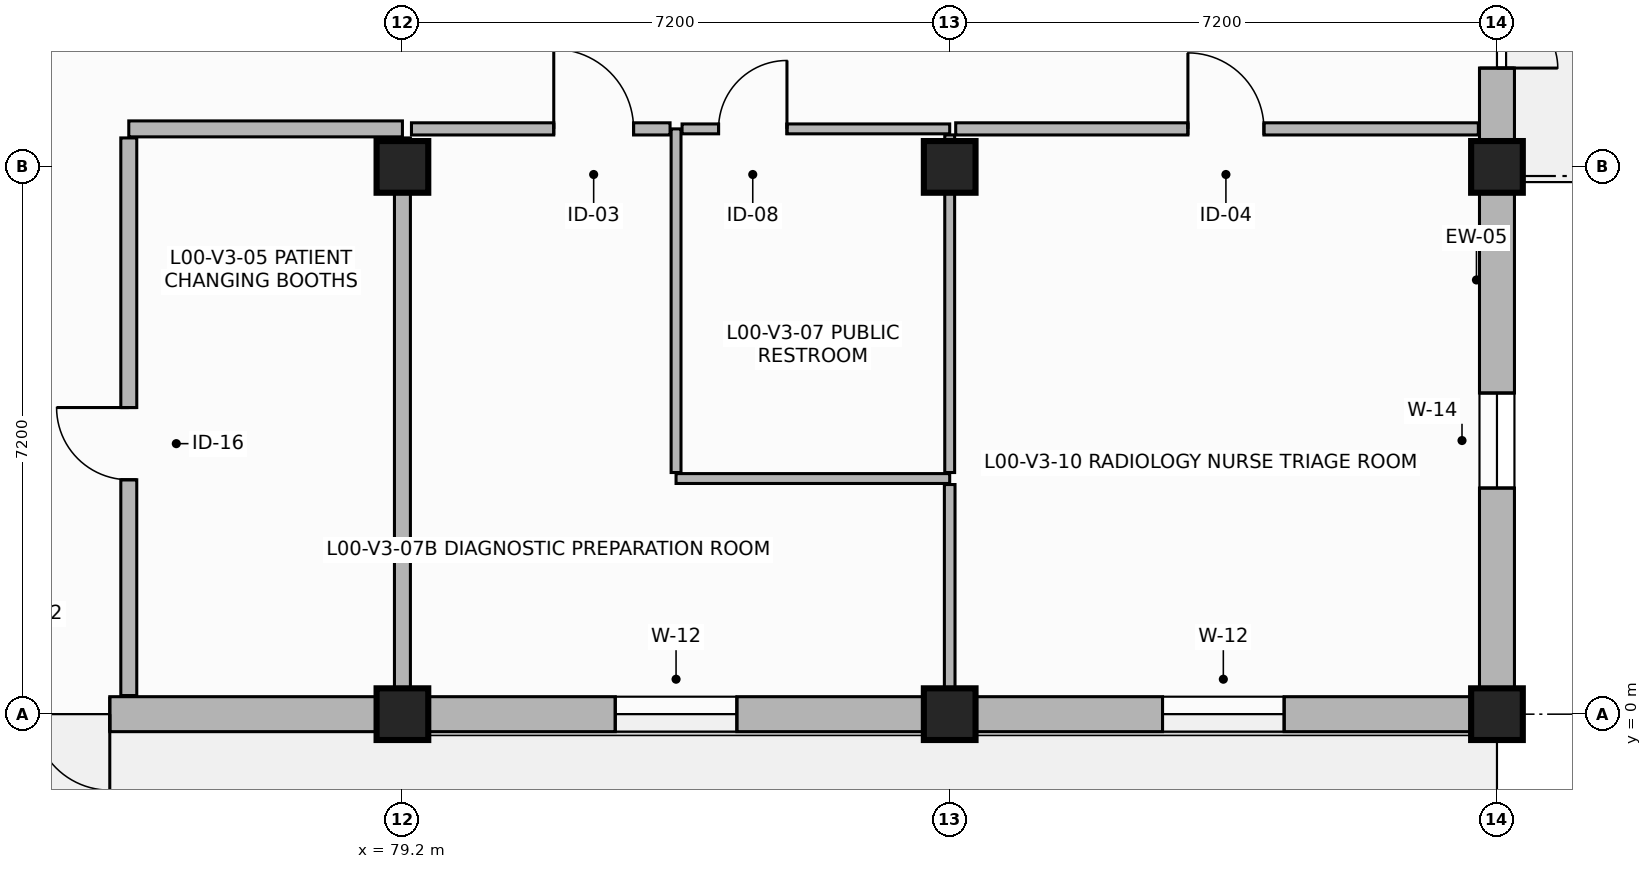
"""IFC4 building model, lengths in metres.
Left out: names, types, materials, properties, quantities, classifications, styles, units other than length and angle.
Written with IfcOpenShell. Run it as: python <this file> out.ifc"""

import sys

from ifc_helpers import new_model, si_unit, direction, frame, frame_2d, origin, origin_2d, place, context, subcontext, project, spatial, rectangle, extrude, element, fill, save


model = new_model("IFC4")
c1 = context("Model", 3, precision=1e-05, world=origin(), true_north=direction((0.0, 1.0)))
c2 = subcontext(c1, "Body", "Model", "MODEL_VIEW")
j1 = project(units=[si_unit("LENGTHUNIT", "METRE"), si_unit("PLANEANGLEUNIT", "RADIAN")], contexts=[c1])
p1 = place(None, origin())
s1 = spatial("IfcSite", under=j1, at=p1, CompositionType="ELEMENT")
p2 = place(p1, origin())
s2 = spatial("IfcBuilding", under=s1, at=p2, CompositionType="ELEMENT")
p3 = place(p2, origin())
s3 = spatial("IfcBuildingStorey", under=s2, at=p3, CompositionType="ELEMENT", Elevation=0.0)
for number, where, z_axis, x_axis in (
    (1, (79.2, 0.0, 0.0), (0.0, 0.0, 1.0), (1.0, 0.0, 0.0)),
    (2, (79.2, 7.2, 0.0), (0.0, 0.0, 1.0), (1.0, 0.0, 0.0)),
    (3, (86.4, 0.0, 0.0), (0.0, 0.0, 1.0), (1.0, 0.0, 0.0)),
    (4, (86.4, 7.2, 0.0), (0.0, 0.0, 1.0), (1.0, 0.0, 0.0)),
    (5, (93.6, 0.0, 0.0), (0.0, 0.0, 1.0), (1.0, 0.0, 0.0)),
    (6, (93.6, 7.2, 0.0), (0.0, 0.0, 1.0), (1.0, 0.0, 0.0)),
):
    element("IfcColumn", number, at=place(p3, frame(where, z_axis=z_axis, x_axis=x_axis)), inside=s3, PredefinedType="COLUMN", context=c2, shape_type="SweptSolid", body=[
        extrude(rectangle(XDim=0.68, YDim=0.68, at=origin_2d()), origin(), (0.0, 0.0, 1.0), 4.15),
    ])
p4 = place(p3, frame((72.0, 0.0, 0.0), z_axis=(0.0, 0.0, 1.0), x_axis=(1.0, 0.0, 0.0)))
e7 = element("IfcWall", 7, at=p4, inside=s3, PredefinedType="SOLIDWALL", context=c2, shape_type="SweptSolid", body=[
    extrude(rectangle(XDim=7.2, YDim=0.46, at=frame_2d((3.6, 0.0))), origin(), (0.0, 0.0, 1.0), 3.43),
])
p5 = place(p4, frame((1.35, 0.0, 0.0)))
e8 = element("IfcOpeningElement", 8, at=p5, cuts=e7, PredefinedType="OPENING", context=c2, shape_type="SweptSolid", body=[
    extrude(rectangle(XDim=2.0, YDim=2.5, at=frame_2d((1.0, 1.25))), frame((0.0, 0.24, 0.0), z_axis=(0.0, -1.0, 0.0), x_axis=(1.0, 0.0, 0.0)), (0.0, 0.0, 1.0), 0.48),
])
p6 = place(p3, frame((79.2, 0.0, 0.0), z_axis=(0.0, 0.0, 1.0), x_axis=(1.0, 0.0, 0.0)))
e9 = element("IfcWall", 9, at=p6, inside=s3, PredefinedType="SOLIDWALL", context=c2, shape_type="SweptSolid", body=[
    extrude(rectangle(XDim=7.2, YDim=0.46, at=frame_2d((3.6, 0.0))), origin(), (0.0, 0.0, 1.0), 3.43),
])
p7 = place(p6, frame((2.8, 0.0, 1.2)))
e10 = element("IfcOpeningElement", 10, at=p7, cuts=e9, PredefinedType="OPENING", context=c2, shape_type="SweptSolid", body=[
    extrude(rectangle(XDim=1.6, YDim=1.4, at=frame_2d((0.8, 0.7))), frame((0.0, 0.24, 0.0), z_axis=(0.0, -1.0, 0.0), x_axis=(1.0, 0.0, 0.0)), (0.0, 0.0, 1.0), 0.48),
])
p8 = place(p3, frame((86.4, 0.0, 0.0), z_axis=(0.0, 0.0, 1.0), x_axis=(1.0, 0.0, 0.0)))
e11 = element("IfcWall", 11, at=p8, inside=s3, PredefinedType="SOLIDWALL", context=c2, shape_type="SweptSolid", body=[
    extrude(rectangle(XDim=7.2, YDim=0.46, at=frame_2d((3.6, 0.0))), origin(), (0.0, 0.0, 1.0), 3.43),
])
p9 = place(p8, frame((2.8, 0.0, 1.2)))
e12 = element("IfcOpeningElement", 12, at=p9, cuts=e11, PredefinedType="OPENING", context=c2, shape_type="SweptSolid", body=[
    extrude(rectangle(XDim=1.6, YDim=1.4, at=frame_2d((0.8, 0.7))), frame((0.0, 0.24, 0.0), z_axis=(0.0, -1.0, 0.0), x_axis=(1.0, 0.0, 0.0)), (0.0, 0.0, 1.0), 0.48),
])
p10 = place(p3, frame((93.6, 0.0, 0.0), z_axis=(0.0, 0.0, 1.0), x_axis=(0.0, 1.0, 0.0)))
e13 = element("IfcWall", 13, at=p10, inside=s3, PredefinedType="SOLIDWALL", context=c2, shape_type="SweptSolid", body=[
    extrude(rectangle(XDim=7.2, YDim=0.46, at=frame_2d((3.6, 0.0))), origin(), (0.0, 0.0, 1.0), 3.43),
])
p11 = place(p10, frame((2.975, 0.0, 1.2)))
e14 = element("IfcOpeningElement", 14, at=p11, cuts=e13, PredefinedType="OPENING", context=c2, shape_type="SweptSolid", body=[
    extrude(rectangle(XDim=1.25, YDim=1.35, at=frame_2d((0.625, 0.675))), frame((0.0, 0.24, 0.0), z_axis=(0.0, -1.0, 0.0), x_axis=(1.0, 0.0, 0.0)), (0.0, 0.0, 1.0), 0.48),
])
p12 = place(p3, frame((93.6, 7.2, 0.0), z_axis=(0.0, 0.0, 1.0), x_axis=(0.0, 1.0, 0.0)))
e15 = element("IfcWall", 15, at=p12, inside=s3, PredefinedType="SOLIDWALL", context=c2, shape_type="SweptSolid", body=[
    extrude(rectangle(XDim=7.2, YDim=0.46, at=frame_2d((3.6, 0.0))), origin(), (0.0, 0.0, 1.0), 3.43),
])
p13 = place(p12, frame((1.3, 0.0, 0.0)))
e16 = element("IfcOpeningElement", 16, at=p13, cuts=e15, PredefinedType="OPENING", context=c2, shape_type="SweptSolid", body=[
    extrude(rectangle(XDim=1.6, YDim=2.4, at=frame_2d((0.8, 1.2))), frame((0.0, 0.24, 0.0), z_axis=(0.0, -1.0, 0.0), x_axis=(1.0, 0.0, 0.0)), (0.0, 0.0, 1.0), 0.48),
])
p14 = place(p3, frame((75.6, 7.7, 0.0), z_axis=(0.0, 0.0, 1.0), x_axis=(1.0, 0.0, 0.0)))
e17 = element("IfcWall", 17, at=p14, inside=s3, PredefinedType="PARTITIONING", context=c2, shape_type="SweptSolid", body=[
    extrude(rectangle(XDim=3.6, YDim=0.21, at=frame_2d((1.8, 0.0))), origin(), (0.0, 0.0, 1.0), 3.41),
])
p15 = place(p3, frame((79.2, 7.581, 0.0), z_axis=(0.0, 0.0, 1.0), x_axis=(0.0, -1.0, 0.0)))
e18 = element("IfcWall", 18, at=p15, inside=s3, PredefinedType="PARTITIONING", context=c2, shape_type="SweptSolid", body=[
    extrude(rectangle(XDim=7.336, YDim=0.21, at=frame_2d((3.668, 0.0))), origin(), (0.0, 0.0, 1.0), 3.41),
])
p16 = place(p3, frame((75.6, 0.245, 0.0), z_axis=(0.0, 0.0, 1.0), x_axis=(0.0, 1.0, 0.0)))
e19 = element("IfcWall", 19, at=p16, inside=s3, PredefinedType="PARTITIONING", context=c2, shape_type="SweptSolid", body=[
    extrude(rectangle(XDim=7.336, YDim=0.21, at=frame_2d((3.668, 0.0))), origin(), (0.0, 0.0, 1.0), 3.41),
])
p17 = place(p16, frame((2.839, 0.0, 0.0)))
e20 = element("IfcOpeningElement", 20, at=p17, cuts=e19, PredefinedType="OPENING", context=c2, shape_type="SweptSolid", body=[
    extrude(rectangle(XDim=0.95, YDim=2.15, at=frame_2d((0.475, 1.075))), frame((0.0, 0.115, 0.0), z_axis=(0.0, -1.0, 0.0), x_axis=(1.0, 0.0, 0.0)), (0.0, 0.0, 1.0), 0.23),
])
p18 = place(p3, frame((86.4, 3.1, 0.0), z_axis=(0.0, 0.0, 1.0), x_axis=(-1.0, 0.0, 0.0)))
e21 = element("IfcWall", 21, at=p18, inside=s3, PredefinedType="PARTITIONING", context=c2, shape_type="SweptSolid", body=[
    extrude(rectangle(XDim=3.6, YDim=0.13, at=frame_2d((1.8, 0.0))), origin(), (0.0, 0.0, 1.0), 3.41),
])
p19 = place(p3, frame((82.8, 3.179, 0.0), z_axis=(0.0, 0.0, 1.0), x_axis=(0.0, 1.0, 0.0)))
e22 = element("IfcWall", 22, at=p19, inside=s3, PredefinedType="PARTITIONING", context=c2, shape_type="SweptSolid", body=[
    extrude(rectangle(XDim=4.521, YDim=0.13, at=frame_2d((2.26, 0.0))), origin(), (0.0, 0.0, 1.0), 3.41),
])
p20 = place(p3, frame((82.879, 7.7, 0.0), z_axis=(0.0, 0.0, 1.0), x_axis=(1.0, 0.0, 0.0)))
e23 = element("IfcWall", 23, at=p20, inside=s3, PredefinedType="PARTITIONING", context=c2, shape_type="SweptSolid", body=[
    extrude(rectangle(XDim=3.521, YDim=0.13, at=frame_2d((1.76, 0.0))), origin(), (0.0, 0.0, 1.0), 3.41),
])
p21 = place(p20, frame((0.48, 0.0, 0.0)))
e24 = element("IfcOpeningElement", 24, at=p21, cuts=e23, PredefinedType="OPENING", context=c2, shape_type="SweptSolid", body=[
    extrude(rectangle(XDim=0.9, YDim=2.1, at=frame_2d((0.45, 1.05))), frame((0.0, 0.075, 0.0), z_axis=(0.0, -1.0, 0.0), x_axis=(1.0, 0.0, 0.0)), (0.0, 0.0, 1.0), 0.15),
])
p22 = place(p3, frame((86.4, 7.621, 0.0), z_axis=(0.0, 0.0, 1.0), x_axis=(0.0, -1.0, 0.0)))
e25 = element("IfcWall", 25, at=p22, inside=s3, PredefinedType="PARTITIONING", context=c2, shape_type="SweptSolid", body=[
    extrude(rectangle(XDim=4.442, YDim=0.13, at=frame_2d((2.221, 0.0))), origin(), (0.0, 0.0, 1.0), 3.41),
])
p23 = place(p3, frame((86.4, 3.021, 0.0), z_axis=(0.0, 0.0, 1.0), x_axis=(0.0, -1.0, 0.0)))
e26 = element("IfcWall", 26, at=p23, inside=s3, PredefinedType="PARTITIONING", context=c2, shape_type="SweptSolid", body=[
    extrude(rectangle(XDim=2.776, YDim=0.14, at=frame_2d((1.388, 0.0))), origin(), (0.0, 0.0, 1.0), 3.41),
])
p24 = place(p3, frame((79.319, 7.7, 0.0), z_axis=(0.0, 0.0, 1.0), x_axis=(1.0, 0.0, 0.0)))
e27 = element("IfcWall", 27, at=p24, inside=s3, PredefinedType="PARTITIONING", context=c2, shape_type="SweptSolid", body=[
    extrude(rectangle(XDim=3.402, YDim=0.16, at=frame_2d((1.701, 0.0))), origin(), (0.0, 0.0, 1.0), 3.41),
])
p25 = place(p24, frame((1.872, 0.0, 0.0)))
e28 = element("IfcOpeningElement", 28, at=p25, cuts=e27, PredefinedType="OPENING", context=c2, shape_type="SweptSolid", body=[
    extrude(rectangle(XDim=1.05, YDim=2.15, at=frame_2d((0.525, 1.075))), frame((0.0, 0.09, 0.0), z_axis=(0.0, -1.0, 0.0), x_axis=(1.0, 0.0, 0.0)), (0.0, 0.0, 1.0), 0.18),
])
p26 = place(p3, frame((86.479, 7.7, 0.0), z_axis=(0.0, 0.0, 1.0), x_axis=(1.0, 0.0, 0.0)))
e29 = element("IfcWall", 29, at=p26, inside=s3, PredefinedType="PARTITIONING", context=c2, shape_type="SweptSolid", body=[
    extrude(rectangle(XDim=6.876, YDim=0.16, at=frame_2d((3.438, 0.0))), origin(), (0.0, 0.0, 1.0), 3.41),
])
p27 = place(p26, frame((3.055, 0.0, 0.0)))
e30 = element("IfcOpeningElement", 30, at=p27, cuts=e29, PredefinedType="OPENING", context=c2, shape_type="SweptSolid", body=[
    extrude(rectangle(XDim=1.0, YDim=2.15, at=frame_2d((0.5, 1.075))), frame((0.0, 0.09, 0.0), z_axis=(0.0, -1.0, 0.0), x_axis=(1.0, 0.0, 0.0)), (0.0, 0.0, 1.0), 0.18),
])
p28 = place(p5, frame((2.0, 0.0, 0.0), z_axis=(0.0, 0.0, 1.0), x_axis=(-1.0, 0.0, 0.0)))
e31 = element("IfcDoor", 31, at=p28, inside=s3, OperationType="DOUBLE_DOOR_SINGLE_SWING", PredefinedType="DOOR", context=c2, shape_type="SweptSolid", body=[
    extrude(rectangle(XDim=2.0, YDim=2.5, at=frame_2d((1.0, 1.25))), frame((0.0, 0.025, 0.0), z_axis=(0.0, -1.0, 0.0), x_axis=(1.0, 0.0, 0.0)), (0.0, 0.0, 1.0), 0.05),
])
fill(e8, e31)
p29 = place(p7, origin())
e32 = element("IfcWindow", 32, at=p29, inside=s3, PartitioningType="SINGLE_PANEL", PredefinedType="WINDOW", context=c2, shape_type="SweptSolid", body=[
    extrude(rectangle(XDim=1.6, YDim=1.4, at=frame_2d((0.8, 0.7))), frame((0.0, 0.03, 0.0), z_axis=(0.0, -1.0, 0.0), x_axis=(1.0, 0.0, 0.0)), (0.0, 0.0, 1.0), 0.06),
])
fill(e10, e32)
p30 = place(p9, origin())
e33 = element("IfcWindow", 33, at=p30, inside=s3, PartitioningType="SINGLE_PANEL", PredefinedType="WINDOW", context=c2, shape_type="SweptSolid", body=[
    extrude(rectangle(XDim=1.6, YDim=1.4, at=frame_2d((0.8, 0.7))), frame((0.0, 0.03, 0.0), z_axis=(0.0, -1.0, 0.0), x_axis=(1.0, 0.0, 0.0)), (0.0, 0.0, 1.0), 0.06),
])
fill(e12, e33)
p31 = place(p11, origin())
e34 = element("IfcWindow", 34, at=p31, inside=s3, PartitioningType="SINGLE_PANEL", PredefinedType="WINDOW", context=c2, shape_type="SweptSolid", body=[
    extrude(rectangle(XDim=1.25, YDim=1.35, at=frame_2d((0.625, 0.675))), frame((0.0, 0.03, 0.0), z_axis=(0.0, -1.0, 0.0), x_axis=(1.0, 0.0, 0.0)), (0.0, 0.0, 1.0), 0.06),
])
fill(e14, e34)
p32 = place(p13, frame((1.6, 0.0, 0.0), z_axis=(0.0, 0.0, 1.0), x_axis=(-1.0, 0.0, 0.0)))
e35 = element("IfcDoor", 35, at=p32, inside=s3, OperationType="DOUBLE_DOOR_SINGLE_SWING", PredefinedType="DOOR", context=c2, shape_type="SweptSolid", body=[
    extrude(rectangle(XDim=1.6, YDim=2.4, at=frame_2d((0.8, 1.2))), frame((0.0, 0.025, 0.0), z_axis=(0.0, -1.0, 0.0), x_axis=(1.0, 0.0, 0.0)), (0.0, 0.0, 1.0), 0.05),
])
fill(e16, e35)
p33 = place(p17, origin())
e36 = element("IfcDoor", 36, at=p33, inside=s3, OperationType="SINGLE_SWING_RIGHT", PredefinedType="DOOR", context=c2, shape_type="SweptSolid", body=[
    extrude(rectangle(XDim=0.95, YDim=2.15, at=frame_2d((0.475, 1.075))), frame((0.0, 0.025, 0.0), z_axis=(0.0, -1.0, 0.0), x_axis=(1.0, 0.0, 0.0)), (0.0, 0.0, 1.0), 0.05),
])
fill(e20, e36)
p34 = place(p21, origin())
e37 = element("IfcDoor", 37, at=p34, inside=s3, OperationType="SINGLE_SWING_RIGHT", PredefinedType="DOOR", context=c2, shape_type="SweptSolid", body=[
    extrude(rectangle(XDim=0.9, YDim=2.1, at=frame_2d((0.45, 1.05))), frame((0.0, 0.025, 0.0), z_axis=(0.0, -1.0, 0.0), x_axis=(1.0, 0.0, 0.0)), (0.0, 0.0, 1.0), 0.05),
])
fill(e24, e37)
p35 = place(p25, origin())
e38 = element("IfcDoor", 38, at=p35, inside=s3, OperationType="SINGLE_SWING_LEFT", PredefinedType="DOOR", context=c2, shape_type="SweptSolid", body=[
    extrude(rectangle(XDim=1.05, YDim=2.15, at=frame_2d((0.525, 1.075))), frame((0.0, 0.025, 0.0), z_axis=(0.0, -1.0, 0.0), x_axis=(1.0, 0.0, 0.0)), (0.0, 0.0, 1.0), 0.05),
])
fill(e28, e38)
p36 = place(p27, origin())
e39 = element("IfcDoor", 39, at=p36, inside=s3, OperationType="SINGLE_SWING_LEFT", PredefinedType="DOOR", context=c2, shape_type="SweptSolid", body=[
    extrude(rectangle(XDim=1.0, YDim=2.15, at=frame_2d((0.5, 1.075))), frame((0.0, 0.025, 0.0), z_axis=(0.0, -1.0, 0.0), x_axis=(1.0, 0.0, 0.0)), (0.0, 0.0, 1.0), 0.05),
])
fill(e30, e39)
save(model, sys.argv[1])
